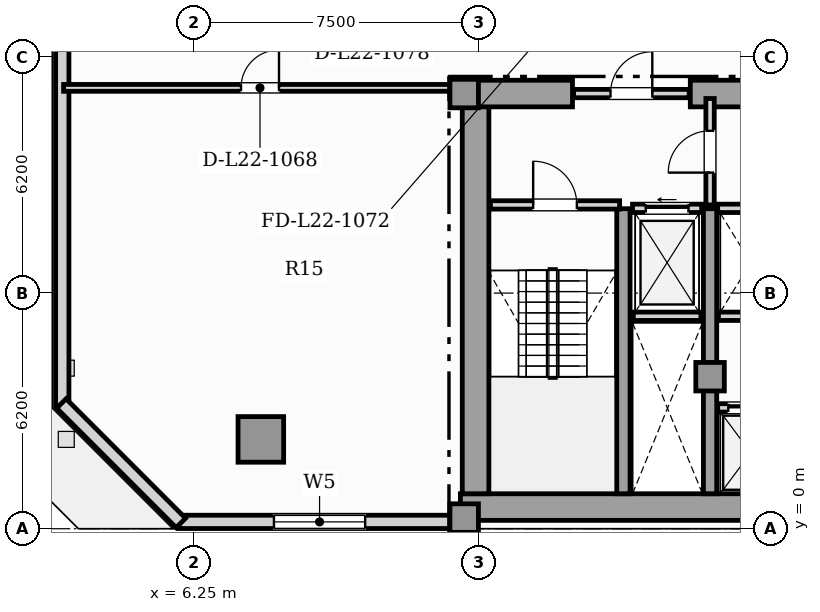
"""IFC4 building model, lengths in metres.
Left out: names, types, materials, properties, quantities, classifications, styles, units other than length and angle.
Written with IfcOpenShell. Run it as: python <this file> out.ifc"""

import sys

from ifc_helpers import new_model, si_unit, direction, frame, frame_2d, origin, origin_2d, place, context, subcontext, project, spatial, rectangle, hollow_rectangle, extrude, element, fill, save


model = new_model("IFC4")
c1 = context("Model", 3, precision=1e-05, world=origin(), true_north=direction((0.0, 1.0)))
c2 = subcontext(c1, "Body", "Model", "MODEL_VIEW")
j1 = project(units=[si_unit("LENGTHUNIT", "METRE"), si_unit("PLANEANGLEUNIT", "RADIAN")], contexts=[c1])
p1 = place(None, origin())
s1 = spatial("IfcSite", under=j1, at=p1, CompositionType="ELEMENT")
p2 = place(p1, origin())
s2 = spatial("IfcBuilding", under=s1, at=p2, CompositionType="ELEMENT")
p3 = place(p2, frame((0.0, 0.0, 92.6)))
s3 = spatial("IfcBuildingStorey", under=s2, at=p3, CompositionType="ELEMENT", Elevation=92.6)
p4 = place(p3, frame((13.25, 0.57, 0.0), z_axis=(0.0, 0.0, 1.0), x_axis=(1.0, 0.0, 0.0)))
e1 = element("IfcWall", 1, at=p4, inside=s3, PredefinedType="SHEAR", context=c2, shape_type="SweptSolid", body=[
    extrude(rectangle(XDim=31.0, YDim=0.7, at=frame_2d((15.5, 0.0))), origin(), (0.0, 0.0, 1.0), 3.6),
])
p5 = place(p3, frame((13.65, 0.92, 0.0), z_axis=(0.0, 0.0, 1.0), x_axis=(0.0, 1.0, 0.0)))
e2 = element("IfcWall", 2, at=p5, inside=s3, PredefinedType="SHEAR", context=c2, shape_type="SweptSolid", body=[
    extrude(rectangle(XDim=10.53, YDim=0.7, at=frame_2d((5.265, 0.0))), origin(), (0.0, 0.0, 1.0), 3.6),
])
p6 = place(p3, frame((13.25, 11.45, 0.0), z_axis=(0.0, 0.0, 1.0), x_axis=(1.0, 0.0, 0.0)))
e3 = element("IfcWall", 3, at=p6, inside=s3, PredefinedType="SHEAR", context=c2, shape_type="SweptSolid", body=[
    extrude(rectangle(XDim=2.95, YDim=0.7, at=frame_2d((1.475, 0.0))), origin(), (0.0, 0.0, 1.0), 3.6),
])
p7 = place(p3, frame((19.3, 11.45, 0.0), z_axis=(0.0, 0.0, 1.0), x_axis=(1.0, 0.0, 0.0)))
e4 = element("IfcWall", 4, at=p7, inside=s3, PredefinedType="SHEAR", context=c2, shape_type="SweptSolid", body=[
    extrude(rectangle(XDim=7.3, YDim=0.7, at=frame_2d((3.65, 0.0))), origin(), (0.0, 0.0, 1.0), 3.6),
])
for number, where, z_axis, x_axis in (
    (5, (17.54, 0.92, 0.0), (0.0, 0.0, 1.0), (0.0, 1.0, 0.0)),
    (6, (19.82, 0.92, 0.0), (0.0, 0.0, 1.0), (0.0, 1.0, 0.0)),
):
    element("IfcWall", number, at=place(p3, frame(where, z_axis=z_axis, x_axis=x_axis)), inside=s3, PredefinedType="SHEAR", context=c2, shape_type="SweptSolid", body=[
        extrude(rectangle(XDim=7.5, YDim=0.35, at=frame_2d((3.75, 0.0))), origin(), (0.0, 0.0, 1.0), 3.6),
    ])
for number, where, z_axis, x_axis in (
    (7, (13.35, 0.28, 0.0), (0.0, 0.0, 1.0), (1.0, 0.0, 0.0)),
    (8, (13.35, 11.45, 0.0), (0.0, 0.0, 1.0), (1.0, 0.0, 0.0)),
    (9, (19.82, 4.0, 0.0), (0.0, 0.0, 1.0), (1.0, 0.0, 0.0)),
):
    element("IfcColumn", number, at=place(p3, frame(where, z_axis=z_axis, x_axis=x_axis)), inside=s3, PredefinedType="COLUMN", context=c2, shape_type="SweptSolid", body=[
        extrude(rectangle(XDim=0.75, YDim=0.75, at=origin_2d()), origin(), (0.0, 0.0, 1.0), 3.85),
    ])
p8 = place(p3, frame((8.0, 2.35, 0.0), z_axis=(0.0, 0.0, 1.0), x_axis=(1.0, 0.0, 0.0)))
e10 = element("IfcColumn", 10, at=p8, inside=s3, PredefinedType="USERDEFINED", context=c2, shape_type="SweptSolid", body=[
    extrude(hollow_rectangle(XDim=1.2, YDim=1.2, WallThickness=0.07, at=origin_2d()), origin(), (0.0, 0.0, 1.0), 3.85),
])
p9 = place(p3, frame((5.84, 0.18, 0.0), z_axis=(0.0, 0.0, 1.0), x_axis=(1.0, 0.0, 0.0)))
e11 = element("IfcWall", 11, at=p9, inside=s3, PredefinedType="SOLIDWALL", context=c2, shape_type="SweptSolid", body=[
    extrude(rectangle(XDim=7.41, YDim=0.35, at=frame_2d((3.705, 0.0))), origin(), (0.0, 0.0, 1.0), 3.6),
])
p10 = place(p9, frame((2.505, 0.0, 0.85)))
e12 = element("IfcOpeningElement", 12, at=p10, cuts=e11, PredefinedType="OPENING", context=c2, shape_type="SweptSolid", body=[
    extrude(rectangle(XDim=2.4, YDim=2.0, at=frame_2d((1.2, 1.0))), frame((0.0, 0.185, 0.0), z_axis=(0.0, -1.0, 0.0), x_axis=(1.0, 0.0, 0.0)), (0.0, 0.0, 1.0), 0.37),
])
p11 = place(p3, frame((2.775, 24.06, 0.0), z_axis=(0.0, 0.0, 1.0), x_axis=(0.0, -1.0, 0.0)))
e13 = element("IfcWall", 13, at=p11, inside=s3, PredefinedType="SOLIDWALL", context=c2, shape_type="SweptSolid", body=[
    extrude(rectangle(XDim=20.82, YDim=0.35, at=frame_2d((10.41, 0.0))), origin(), (0.0, 0.0, 1.0), 3.6),
])
p12 = place(p11, frame((4.613, 0.0, 0.85)))
e14 = element("IfcOpeningElement", 14, at=p12, cuts=e13, PredefinedType="OPENING", context=c2, shape_type="SweptSolid", body=[
    extrude(rectangle(XDim=2.4, YDim=2.0, at=frame_2d((1.2, 1.0))), frame((0.0, 0.185, 0.0), z_axis=(0.0, -1.0, 0.0), x_axis=(1.0, 0.0, 0.0)), (0.0, 0.0, 1.0), 0.37),
])
p13 = place(p3, frame((2.752, 3.295, 0.0), z_axis=(0.0, 0.0, 1.0), x_axis=(0.707134240044, -0.707079321262, 0.0)))
e15 = element("IfcWall", 15, at=p13, inside=s3, PredefinedType="SOLIDWALL", context=c2, shape_type="SweptSolid", body=[
    extrude(rectangle(XDim=4.446, YDim=0.35, at=frame_2d((2.223, 0.0))), origin(), (0.0, 0.0, 1.0), 3.6),
])
p14 = place(p3, frame((17.8, 5.59, 0.0), z_axis=(0.0, 0.0, 1.0), x_axis=(1.0, 0.0, 0.0)))
e16 = element("IfcWall", 16, at=p14, inside=s3, PredefinedType="SOLIDWALL", context=c2, shape_type="SweptSolid", body=[
    extrude(rectangle(XDim=1.78, YDim=0.22, at=frame_2d((0.89, 0.0))), origin(), (0.0, 0.0, 1.0), 3.6),
])
p15 = place(p3, frame((17.78, 8.43, 0.0), z_axis=(0.0, 0.0, 1.0), x_axis=(1.0, 0.0, 0.0)))
e17 = element("IfcWall", 17, at=p15, inside=s3, PredefinedType="SOLIDWALL", context=c2, shape_type="SweptSolid", body=[
    extrude(rectangle(XDim=1.82, YDim=0.22, at=frame_2d((0.91, 0.0))), origin(), (0.0, 0.0, 1.0), 3.6),
])
p16 = place(p15, frame((0.35, 0.0, 0.0)))
e18 = element("IfcOpeningElement", 18, at=p16, cuts=e17, PredefinedType="OPENING", context=c2, shape_type="SweptSolid", body=[
    extrude(rectangle(XDim=1.12, YDim=2.25, at=frame_2d((0.56, 1.125))), frame((0.0, 0.12, 0.0), z_axis=(0.0, -1.0, 0.0), x_axis=(1.0, 0.0, 0.0)), (0.0, 0.0, 1.0), 0.24),
])
p17 = place(p3, frame((20.02, 3.18, 0.0), z_axis=(0.0, 0.0, 1.0), x_axis=(1.0, 0.0, 0.0)))
e19 = element("IfcWall", 19, at=p17, inside=s3, PredefinedType="SOLIDWALL", context=c2, shape_type="SweptSolid", body=[
    extrude(rectangle(XDim=1.74, YDim=0.22, at=frame_2d((0.87, 0.0))), origin(), (0.0, 0.0, 1.0), 3.6),
])
p18 = place(p17, frame((0.28, 0.0, 0.0)))
e20 = element("IfcOpeningElement", 20, at=p18, cuts=e19, PredefinedType="OPENING", context=c2, shape_type="SweptSolid", body=[
    extrude(rectangle(XDim=1.18, YDim=2.2, at=frame_2d((0.59, 1.1))), frame((0.0, 0.12, 0.0), z_axis=(0.0, -1.0, 0.0), x_axis=(1.0, 0.0, 0.0)), (0.0, 0.0, 1.0), 0.24),
])
p19 = place(p3, frame((20.04, 5.59, 0.0), z_axis=(0.0, 0.0, 1.0), x_axis=(1.0, 0.0, 0.0)))
e21 = element("IfcWall", 21, at=p19, inside=s3, PredefinedType="SOLIDWALL", context=c2, shape_type="SweptSolid", body=[
    extrude(rectangle(XDim=1.7, YDim=0.22, at=frame_2d((0.85, 0.0))), origin(), (0.0, 0.0, 1.0), 3.6),
])
p20 = place(p3, frame((20.02, 8.43, 0.0), z_axis=(0.0, 0.0, 1.0), x_axis=(1.0, 0.0, 0.0)))
e22 = element("IfcWall", 22, at=p20, inside=s3, PredefinedType="SOLIDWALL", context=c2, shape_type="SweptSolid", body=[
    extrude(rectangle(XDim=1.74, YDim=0.22, at=frame_2d((0.87, 0.0))), origin(), (0.0, 0.0, 1.0), 3.6),
])
p21 = place(p3, frame((14.04, 8.52, 0.0), z_axis=(0.0, 0.0, 1.0), x_axis=(1.0, 0.0, 0.0)))
e23 = element("IfcWall", 23, at=p21, inside=s3, PredefinedType="SOLIDWALL", context=c2, shape_type="SweptSolid", body=[
    extrude(rectangle(XDim=3.4, YDim=0.22, at=frame_2d((1.7, 0.0))), origin(), (0.0, 0.0, 1.0), 3.6),
])
p22 = place(p21, frame((1.125, 0.0, 0.0)))
e24 = element("IfcOpeningElement", 24, at=p22, cuts=e23, PredefinedType="OPENING", context=c2, shape_type="SweptSolid", body=[
    extrude(rectangle(XDim=1.15, YDim=2.2, at=frame_2d((0.575, 1.1))), frame((0.0, 0.12, 0.0), z_axis=(0.0, -1.0, 0.0), x_axis=(1.0, 0.0, 0.0)), (0.0, 0.0, 1.0), 0.24),
])
p23 = place(p3, frame((19.82, 8.52, 0.0), z_axis=(0.0, 0.0, 1.0), x_axis=(0.0, 1.0, 0.0)))
e25 = element("IfcWall", 25, at=p23, inside=s3, PredefinedType="SOLIDWALL", context=c2, shape_type="SweptSolid", body=[
    extrude(rectangle(XDim=2.8, YDim=0.22, at=frame_2d((1.4, 0.0))), origin(), (0.0, 0.0, 1.0), 3.055),
])
p24 = place(p23, frame((0.85, 0.0, 0.0)))
e26 = element("IfcOpeningElement", 26, at=p24, cuts=e25, PredefinedType="OPENING", context=c2, shape_type="SweptSolid", body=[
    extrude(rectangle(XDim=1.1, YDim=2.2, at=frame_2d((0.55, 1.1))), frame((0.0, 0.12, 0.0), z_axis=(0.0, -1.0, 0.0), x_axis=(1.0, 0.0, 0.0)), (0.0, 0.0, 1.0), 0.24),
])
p25 = place(p3, frame((16.23, 11.45, 0.0), z_axis=(0.0, 0.0, 1.0), x_axis=(1.0, 0.0, 0.0)))
e27 = element("IfcWall", 27, at=p25, inside=s3, PredefinedType="SOLIDWALL", context=c2, shape_type="SweptSolid", body=[
    extrude(rectangle(XDim=3.04, YDim=0.22, at=frame_2d((1.52, 0.0))), origin(), (0.0, 0.0, 1.0), 3.6),
])
p26 = place(p25, frame((0.97, 0.0, 0.0)))
e28 = element("IfcOpeningElement", 28, at=p26, cuts=e27, PredefinedType="OPENING", context=c2, shape_type="SweptSolid", body=[
    extrude(rectangle(XDim=1.1, YDim=2.2, at=frame_2d((0.55, 1.1))), frame((0.0, 0.12, 0.0), z_axis=(0.0, -1.0, 0.0), x_axis=(1.0, 0.0, 0.0)), (0.0, 0.0, 1.0), 0.24),
])
p27 = place(p3, frame((2.81, 11.6, 0.0), z_axis=(0.0, 0.0, 1.0), x_axis=(1.0, 0.0, 0.0)))
e29 = element("IfcWall", 29, at=p27, inside=s3, PredefinedType="PARTITIONING", context=c2, shape_type="SweptSolid", body=[
    extrude(rectangle(XDim=10.335, YDim=0.18, at=frame_2d((5.167, 0.0))), origin(), (0.0, 0.0, 1.0), 3.6),
])
p28 = place(p27, frame((4.667, 0.0, 0.0)))
e30 = element("IfcOpeningElement", 30, at=p28, cuts=e29, PredefinedType="OPENING", context=c2, shape_type="SweptSolid", body=[
    extrude(rectangle(XDim=1.0, YDim=2.15, at=frame_2d((0.5, 1.075))), frame((0.0, 0.1, 0.0), z_axis=(0.0, -1.0, 0.0), x_axis=(1.0, 0.0, 0.0)), (0.0, 0.0, 1.0), 0.2),
])
p29 = place(p10, origin())
e31 = element("IfcWindow", 31, at=p29, inside=s3, PartitioningType="SINGLE_PANEL", PredefinedType="WINDOW", context=c2, shape_type="SweptSolid", body=[
    extrude(rectangle(XDim=2.4, YDim=2.0, at=frame_2d((1.2, 1.0))), frame((0.0, 0.03, 0.0), z_axis=(0.0, -1.0, 0.0), x_axis=(1.0, 0.0, 0.0)), (0.0, 0.0, 1.0), 0.06),
])
fill(e12, e31)
p30 = place(p16, origin())
e32 = element("IfcDoor", 32, at=p30, inside=s3, OperationType="SLIDING_TO_LEFT", PredefinedType="DOOR", context=c2, shape_type="SweptSolid", body=[
    extrude(rectangle(XDim=1.12, YDim=2.25, at=frame_2d((0.56, 1.125))), frame((0.0, 0.025, 0.0), z_axis=(0.0, -1.0, 0.0), x_axis=(1.0, 0.0, 0.0)), (0.0, 0.0, 1.0), 0.05),
])
fill(e18, e32)
p31 = place(p18, origin())
e33 = element("IfcDoor", 33, at=p31, inside=s3, OperationType="SLIDING_TO_RIGHT", PredefinedType="DOOR", context=c2, shape_type="SweptSolid", body=[
    extrude(rectangle(XDim=1.18, YDim=2.2, at=frame_2d((0.59, 1.1))), frame((0.0, 0.025, 0.0), z_axis=(0.0, -1.0, 0.0), x_axis=(1.0, 0.0, 0.0)), (0.0, 0.0, 1.0), 0.05),
])
fill(e20, e33)
p32 = place(p22, origin())
e34 = element("IfcDoor", 34, at=p32, inside=s3, OperationType="SINGLE_SWING_LEFT", PredefinedType="DOOR", context=c2, shape_type="SweptSolid", body=[
    extrude(rectangle(XDim=1.15, YDim=2.2, at=frame_2d((0.575, 1.1))), frame((0.0, 0.025, 0.0), z_axis=(0.0, -1.0, 0.0), x_axis=(1.0, 0.0, 0.0)), (0.0, 0.0, 1.0), 0.05),
])
fill(e24, e34)
p33 = place(p24, origin())
e35 = element("IfcDoor", 35, at=p33, inside=s3, OperationType="SINGLE_SWING_LEFT", PredefinedType="DOOR", context=c2, shape_type="SweptSolid", body=[
    extrude(rectangle(XDim=1.1, YDim=2.2, at=frame_2d((0.55, 1.1))), frame((0.0, 0.025, 0.0), z_axis=(0.0, -1.0, 0.0), x_axis=(1.0, 0.0, 0.0)), (0.0, 0.0, 1.0), 0.05),
])
fill(e26, e35)
p34 = place(p26, origin())
e36 = element("IfcDoor", 36, at=p34, inside=s3, OperationType="SINGLE_SWING_RIGHT", PredefinedType="DOOR", context=c2, shape_type="SweptSolid", body=[
    extrude(rectangle(XDim=1.1, YDim=2.2, at=frame_2d((0.55, 1.1))), frame((0.0, 0.025, 0.0), z_axis=(0.0, -1.0, 0.0), x_axis=(1.0, 0.0, 0.0)), (0.0, 0.0, 1.0), 0.05),
])
fill(e28, e36)
p35 = place(p28, origin())
e37 = element("IfcDoor", 37, at=p35, inside=s3, OperationType="SINGLE_SWING_RIGHT", PredefinedType="DOOR", context=c2, shape_type="SweptSolid", body=[
    extrude(rectangle(XDim=1.0, YDim=2.15, at=frame_2d((0.5, 1.075))), frame((0.0, 0.025, 0.0), z_axis=(0.0, -1.0, 0.0), x_axis=(1.0, 0.0, 0.0)), (0.0, 0.0, 1.0), 0.05),
])
fill(e30, e37)
save(model, sys.argv[1])
